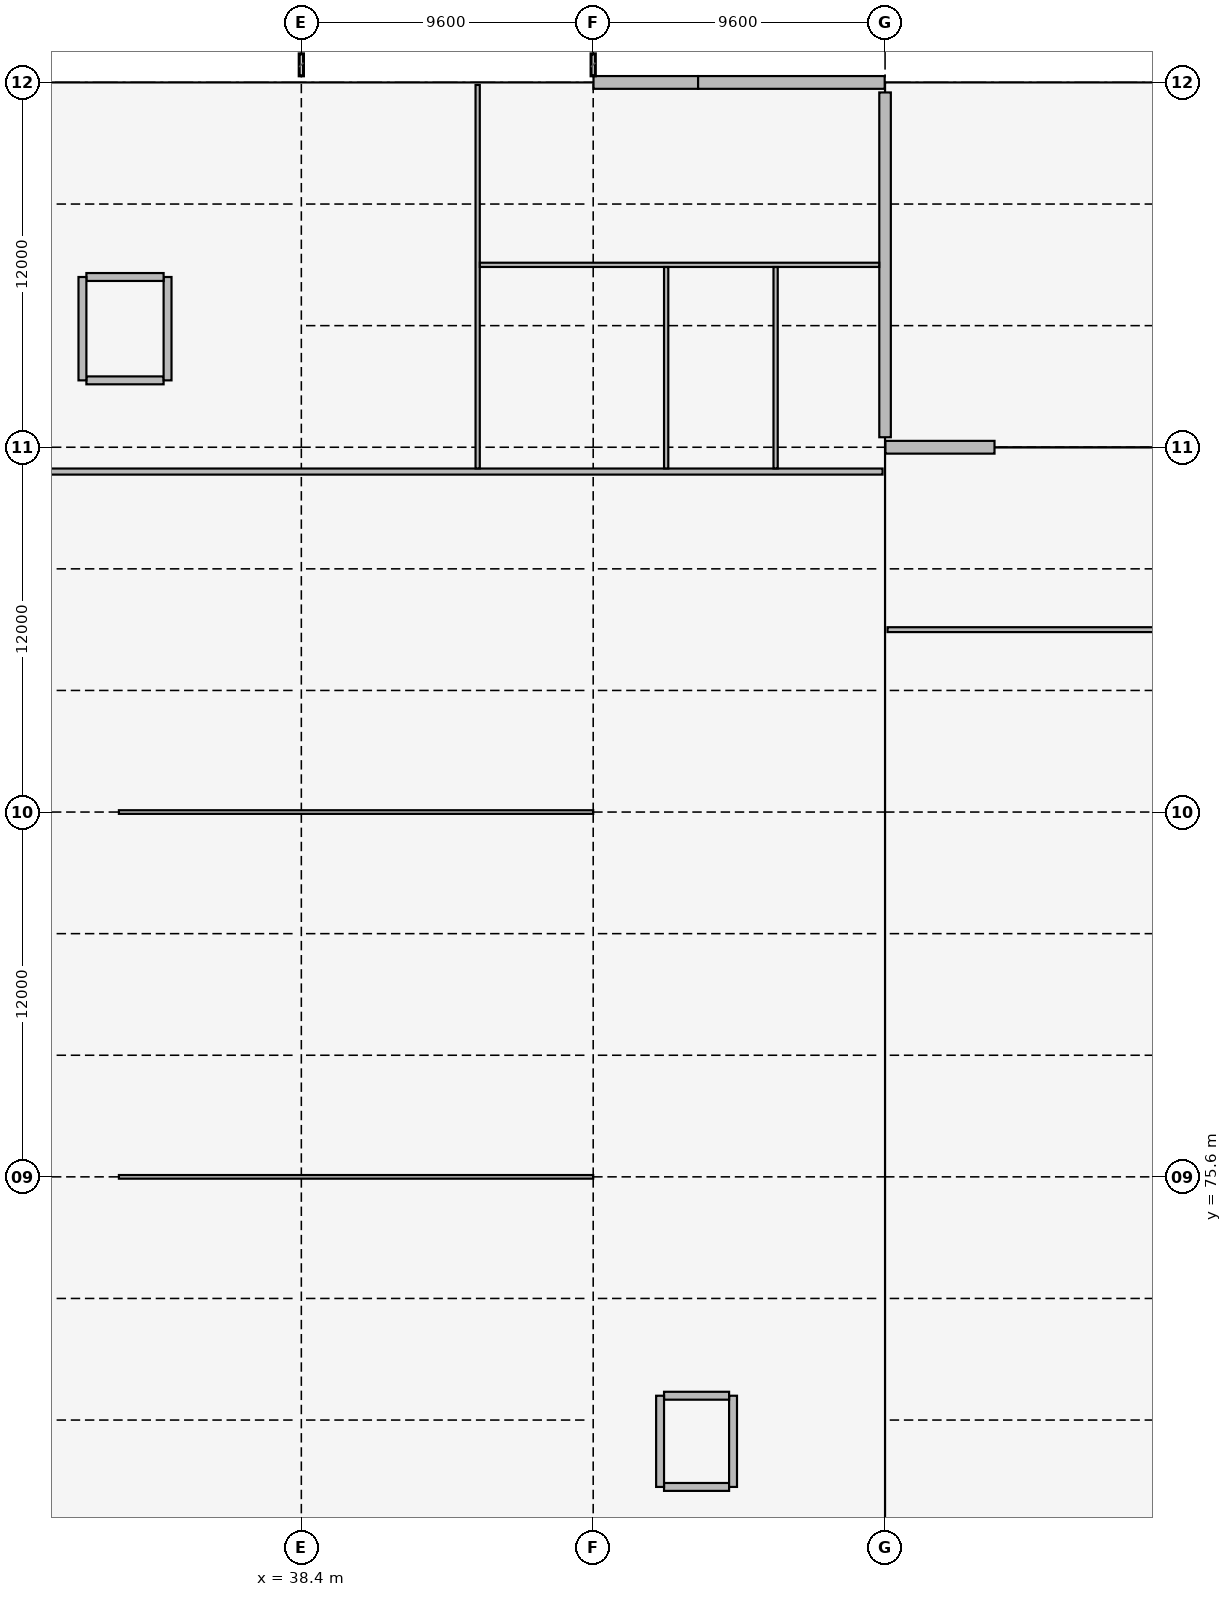
"""IFC4 building model, lengths in metres.
Left out: names, types, materials, properties, quantities, classifications, styles, units other than length and angle.
Written with IfcOpenShell. Run it as: python <this file> out.ifc"""

import sys

from ifc_helpers import new_model, si_unit, direction, frame, frame_2d, origin, origin_2d, place, context, subcontext, project, spatial, rectangle, i_section, extrude, element, fill, save


model = new_model("IFC4")
c1 = context("Model", 3, precision=1e-05, world=origin(), true_north=direction((0.0, 1.0)))
c2 = subcontext(c1, "Body", "Model", "MODEL_VIEW")
j1 = project(units=[si_unit("LENGTHUNIT", "METRE"), si_unit("PLANEANGLEUNIT", "RADIAN")], contexts=[c1])
p1 = place(None, origin())
s1 = spatial("IfcSite", under=j1, at=p1, CompositionType="ELEMENT")
p2 = place(p1, origin())
s2 = spatial("IfcBuilding", under=s1, at=p2, CompositionType="ELEMENT")
p3 = place(p2, origin())
s3 = spatial("IfcBuildingStorey", under=s2, at=p3, CompositionType="ELEMENT", Elevation=0.0)
for number, where, z_axis, x_axis in (
    (1, (38.4, 99.6, 0.0), (0.0, 0.0, 1.0), (1.0, 0.0, 0.0)),
    (2, (38.4, 111.6, 0.0), (0.0, 0.0, 1.0), (1.0, 0.0, 0.0)),
):
    element("IfcColumn", number, at=place(p3, frame(where, z_axis=z_axis, x_axis=x_axis)), inside=s3, PredefinedType="COLUMN", context=c2, shape_type="SweptSolid", body=[
        extrude(i_section(OverallWidth=0.3, OverallDepth=0.54, WebThickness=0.012, FlangeThickness=0.024, FilletRadius=0.027, at=origin_2d()), origin(), (0.0, 0.0, 1.0), 5.4),
    ])
p4 = place(p3, frame((48.0, 75.6, 0.0), z_axis=(0.0, 0.0, 1.0), x_axis=(1.0, 0.0, 0.0)))
e3 = element("IfcColumn", 3, at=p4, inside=s3, PredefinedType="COLUMN", context=c2, shape_type="SweptSolid", body=[
    extrude(i_section(OverallWidth=0.3, OverallDepth=0.44, WebThickness=0.011, FlangeThickness=0.021, FilletRadius=0.027, at=origin_2d()), origin(), (0.0, 0.0, 1.0), 5.4),
])
for number, where, z_axis, x_axis in (
    (4, (48.0, 87.6, 0.0), (0.0, 0.0, 1.0), (1.0, 0.0, 0.0)),
    (5, (48.0, 99.6, 0.0), (0.0, 0.0, 1.0), (1.0, 0.0, 0.0)),
    (6, (48.0, 111.6, 0.0), (0.0, 0.0, 1.0), (1.0, 0.0, 0.0)),
):
    element("IfcColumn", number, at=place(p3, frame(where, z_axis=z_axis, x_axis=x_axis)), inside=s3, PredefinedType="COLUMN", context=c2, shape_type="SweptSolid", body=[
        extrude(i_section(OverallWidth=0.3, OverallDepth=0.54, WebThickness=0.012, FlangeThickness=0.024, FilletRadius=0.027, at=origin_2d()), origin(), (0.0, 0.0, 1.0), 5.4),
    ])
for number, where, z_axis, x_axis in (
    (7, (57.6, 75.6, 0.0), (0.0, 0.0, 1.0), (1.0, 0.0, 0.0)),
    (8, (57.6, 87.6, 0.0), (0.0, 0.0, 1.0), (1.0, 0.0, 0.0)),
    (9, (57.6, 99.6, 0.0), (0.0, 0.0, 1.0), (1.0, 0.0, 0.0)),
    (10, (57.6, 111.6, 0.0), (0.0, 0.0, 1.0), (1.0, 0.0, 0.0)),
):
    element("IfcColumn", number, at=place(p3, frame(where, z_axis=z_axis, x_axis=x_axis)), inside=s3, PredefinedType="COLUMN", context=c2, shape_type="SweptSolid", body=[
        extrude(i_section(OverallWidth=0.3, OverallDepth=0.65, WebThickness=0.016, FlangeThickness=0.031, FilletRadius=0.027, at=origin_2d()), origin(), (0.0, 0.0, 1.0), 5.4),
    ])
p5 = place(p3, frame((50.33, 65.4, 0.0), z_axis=(0.0, 0.0, 1.0), x_axis=(1.0, 0.0, 0.0)))
e11 = element("IfcWall", 11, at=p5, inside=s3, PredefinedType="SHEAR", context=c2, shape_type="SweptSolid", body=[
    extrude(rectangle(XDim=2.14, YDim=0.26, at=frame_2d((1.07, 0.0))), origin(), (0.0, 0.0, 1.0), 5.12),
])
p6 = place(p3, frame((52.6, 65.4, 0.0), z_axis=(0.0, 0.0, 1.0), x_axis=(0.0, 1.0, 0.0)))
e12 = element("IfcWall", 12, at=p6, inside=s3, PredefinedType="SHEAR", context=c2, shape_type="SweptSolid", body=[
    extrude(rectangle(XDim=3.0, YDim=0.26, at=frame_2d((1.5, 0.0))), origin(), (0.0, 0.0, 1.0), 5.12),
])
p7 = place(p6, frame((0.95, 0.0, 0.0)))
e13 = element("IfcOpeningElement", 13, at=p7, cuts=e12, PredefinedType="OPENING", context=c2, shape_type="SweptSolid", body=[
    extrude(rectangle(XDim=1.1, YDim=2.1, at=frame_2d((0.55, 1.05))), frame((0.0, 0.14, 0.0), z_axis=(0.0, -1.0, 0.0), x_axis=(1.0, 0.0, 0.0)), (0.0, 0.0, 1.0), 0.28),
])
p8 = place(p3, frame((52.47, 68.4, 0.0), z_axis=(0.0, 0.0, 1.0), x_axis=(-1.0, 0.0, 0.0)))
e14 = element("IfcWall", 14, at=p8, inside=s3, PredefinedType="SHEAR", context=c2, shape_type="SweptSolid", body=[
    extrude(rectangle(XDim=2.14, YDim=0.26, at=frame_2d((1.07, 0.0))), origin(), (0.0, 0.0, 1.0), 5.12),
])
p9 = place(p3, frame((50.2, 68.4, 0.0), z_axis=(0.0, 0.0, 1.0), x_axis=(0.0, -1.0, 0.0)))
e15 = element("IfcWall", 15, at=p9, inside=s3, PredefinedType="SHEAR", context=c2, shape_type="SweptSolid", body=[
    extrude(rectangle(XDim=3.0, YDim=0.26, at=frame_2d((1.5, 0.0))), origin(), (0.0, 0.0, 1.0), 5.12),
])
p10 = place(p3, frame((31.33, 101.8, 0.0), z_axis=(0.0, 0.0, 1.0), x_axis=(1.0, 0.0, 0.0)))
e16 = element("IfcWall", 16, at=p10, inside=s3, PredefinedType="SHEAR", context=c2, shape_type="SweptSolid", body=[
    extrude(rectangle(XDim=2.54, YDim=0.26, at=frame_2d((1.27, 0.0))), origin(), (0.0, 0.0, 1.0), 5.12),
])
p11 = place(p3, frame((34.0, 101.8, 0.0), z_axis=(0.0, 0.0, 1.0), x_axis=(0.0, 1.0, 0.0)))
e17 = element("IfcWall", 17, at=p11, inside=s3, PredefinedType="SHEAR", context=c2, shape_type="SweptSolid", body=[
    extrude(rectangle(XDim=3.4, YDim=0.26, at=frame_2d((1.7, 0.0))), origin(), (0.0, 0.0, 1.0), 5.12),
])
p12 = place(p3, frame((33.87, 105.2, 0.0), z_axis=(0.0, 0.0, 1.0), x_axis=(-1.0, 0.0, 0.0)))
e18 = element("IfcWall", 18, at=p12, inside=s3, PredefinedType="SHEAR", context=c2, shape_type="SweptSolid", body=[
    extrude(rectangle(XDim=2.54, YDim=0.26, at=frame_2d((1.27, 0.0))), origin(), (0.0, 0.0, 1.0), 5.12),
])
p13 = place(p12, frame((0.57, 0.0, 0.0)))
e19 = element("IfcOpeningElement", 19, at=p13, cuts=e18, PredefinedType="OPENING", context=c2, shape_type="SweptSolid", body=[
    extrude(rectangle(XDim=1.4, YDim=2.25, at=frame_2d((0.7, 1.125))), frame((0.0, 0.14, 0.0), z_axis=(0.0, -1.0, 0.0), x_axis=(1.0, 0.0, 0.0)), (0.0, 0.0, 1.0), 0.28),
])
p14 = place(p3, frame((31.2, 105.2, 0.0), z_axis=(0.0, 0.0, 1.0), x_axis=(0.0, -1.0, 0.0)))
e20 = element("IfcWall", 20, at=p14, inside=s3, PredefinedType="SHEAR", context=c2, shape_type="SweptSolid", body=[
    extrude(rectangle(XDim=3.4, YDim=0.26, at=frame_2d((1.7, 0.0))), origin(), (0.0, 0.0, 1.0), 5.12),
])
p15 = place(p3, frame((48.01, 111.6, 0.0), z_axis=(0.0, 0.0, 1.0), x_axis=(1.0, 0.0, 0.0)))
e21 = element("IfcWall", 21, at=p15, inside=s3, PredefinedType="STANDARD", context=c2, shape_type="SweptSolid", body=[
    extrude(rectangle(XDim=3.44, YDim=0.42, at=frame_2d((1.72, 0.0))), origin(), (0.0, 0.0, 1.0), 4.665),
])
p16 = place(p15, frame((0.45, 0.0, 0.0)))
e22 = element("IfcOpeningElement", 22, at=p16, cuts=e21, PredefinedType="OPENING", context=c2, shape_type="SweptSolid", body=[
    extrude(rectangle(XDim=2.2, YDim=2.4, at=frame_2d((1.1, 1.2))), frame((0.0, 0.22, 0.0), z_axis=(0.0, -1.0, 0.0), x_axis=(1.0, 0.0, 0.0)), (0.0, 0.0, 1.0), 0.44),
])
p17 = place(p3, frame((51.45, 111.6, 0.0), z_axis=(0.0, 0.0, 1.0), x_axis=(1.0, 0.0, 0.0)))
e23 = element("IfcWall", 23, at=p17, inside=s3, PredefinedType="STANDARD", context=c2, shape_type="SweptSolid", body=[
    extrude(rectangle(XDim=6.138, YDim=0.42, at=frame_2d((3.069, 0.0))), origin(), (0.0, 0.0, 1.0), 4.665),
])
p18 = place(p17, frame((0.6, 0.0, 1.5)))
e24 = element("IfcOpeningElement", 24, at=p18, cuts=e23, PredefinedType="OPENING", context=c2, shape_type="SweptSolid", body=[
    extrude(rectangle(XDim=3.2, YDim=1.2, at=frame_2d((1.6, 0.6))), frame((0.0, 0.22, 0.0), z_axis=(0.0, -1.0, 0.0), x_axis=(1.0, 0.0, 0.0)), (0.0, 0.0, 1.0), 0.44),
])
p19 = place(p3, frame((57.6, 111.271, 0.0), z_axis=(0.0, 0.0, 1.0), x_axis=(0.0, -1.0, 0.0)))
e25 = element("IfcWall", 25, at=p19, inside=s3, PredefinedType="STANDARD", context=c2, shape_type="SweptSolid", body=[
    extrude(rectangle(XDim=11.342, YDim=0.38, at=frame_2d((5.671, 0.0))), origin(), (0.0, 0.0, 1.0), 4.7),
])
p20 = place(p19, frame((0.45, 0.0, 1.2)))
e26 = element("IfcOpeningElement", 26, at=p20, cuts=e25, PredefinedType="OPENING", context=c2, shape_type="SweptSolid", body=[
    extrude(rectangle(XDim=1.65, YDim=1.75, at=frame_2d((0.825, 0.875))), frame((0.0, 0.2, 0.0), z_axis=(0.0, -1.0, 0.0), x_axis=(1.0, 0.0, 0.0)), (0.0, 0.0, 1.0), 0.4),
])
p21 = place(p19, frame((3.05, 0.0, 1.2)))
e27 = element("IfcOpeningElement", 27, at=p21, cuts=e25, PredefinedType="OPENING", context=c2, shape_type="SweptSolid", body=[
    extrude(rectangle(XDim=2.7, YDim=1.8, at=frame_2d((1.35, 0.9))), frame((0.0, 0.2, 0.0), z_axis=(0.0, -1.0, 0.0), x_axis=(1.0, 0.0, 0.0)), (0.0, 0.0, 1.0), 0.4),
])
p22 = place(p19, frame((6.6, 0.0, 1.2)))
e28 = element("IfcOpeningElement", 28, at=p22, cuts=e25, PredefinedType="OPENING", context=c2, shape_type="SweptSolid", body=[
    extrude(rectangle(XDim=1.35, YDim=1.75, at=frame_2d((0.675, 0.875))), frame((0.0, 0.2, 0.0), z_axis=(0.0, -1.0, 0.0), x_axis=(1.0, 0.0, 0.0)), (0.0, 0.0, 1.0), 0.4),
])
p23 = place(p3, frame((57.612, 99.6, 0.0), z_axis=(0.0, 0.0, 1.0), x_axis=(1.0, 0.0, 0.0)))
e29 = element("IfcWall", 29, at=p23, inside=s3, PredefinedType="STANDARD", context=c2, shape_type="SweptSolid", body=[
    extrude(rectangle(XDim=3.588, YDim=0.42, at=frame_2d((1.794, 0.0))), origin(), (0.0, 0.0, 1.0), 4.665),
])
p24 = place(p23, frame((0.45, 0.0, 0.0)))
e30 = element("IfcOpeningElement", 30, at=p24, cuts=e29, PredefinedType="OPENING", context=c2, shape_type="SweptSolid", body=[
    extrude(rectangle(XDim=2.2, YDim=2.4, at=frame_2d((1.1, 1.2))), frame((0.0, 0.22, 0.0), z_axis=(0.0, -1.0, 0.0), x_axis=(1.0, 0.0, 0.0)), (0.0, 0.0, 1.0), 0.44),
])
for number, where, z_axis, x_axis in (
    (31, (32.4, 75.6, 0.0), (0.0, 0.0, 1.0), (1.0, 0.0, 0.0)),
    (32, (32.4, 87.6, 0.0), (0.0, 0.0, 1.0), (1.0, 0.0, 0.0)),
):
    element("IfcWall", number, at=place(p3, frame(where, z_axis=z_axis, x_axis=x_axis)), inside=s3, PredefinedType="PARTITIONING", context=c2, shape_type="SweptSolid", body=[
        extrude(rectangle(XDim=15.6, YDim=0.12, at=frame_2d((7.8, 0.0))), origin(), (0.0, 0.0, 1.0), 2.4),
    ])
p25 = place(p3, frame((0.212, 98.8, 0.0), z_axis=(0.0, 0.0, 1.0), x_axis=(1.0, 0.0, 0.0)))
e33 = element("IfcWall", 33, at=p25, inside=s3, PredefinedType="PARTITIONING", context=c2, shape_type="SweptSolid", body=[
    extrude(rectangle(XDim=57.306, YDim=0.2, at=frame_2d((28.653, 0.0))), origin(), (0.0, 0.0, 1.0), 5.04),
])
p26 = place(p25, frame((13.5, 0.0, 0.0)))
e34 = element("IfcOpeningElement", 34, at=p26, cuts=e33, PredefinedType="OPENING", context=c2, shape_type="SweptSolid", body=[
    extrude(rectangle(XDim=1.6, YDim=2.2, at=frame_2d((0.8, 1.1))), frame((0.0, 0.11, 0.0), z_axis=(0.0, -1.0, 0.0), x_axis=(1.0, 0.0, 0.0)), (0.0, 0.0, 1.0), 0.22),
])
p27 = place(p25, frame((33.333, 0.0, 0.0)))
e35 = element("IfcOpeningElement", 35, at=p27, cuts=e33, PredefinedType="OPENING", context=c2, shape_type="SweptSolid", body=[
    extrude(rectangle(XDim=1.6, YDim=2.2, at=frame_2d((0.8, 1.1))), frame((0.0, 0.11, 0.0), z_axis=(0.0, -1.0, 0.0), x_axis=(1.0, 0.0, 0.0)), (0.0, 0.0, 1.0), 0.22),
])
p28 = place(p25, frame((44.267, 0.0, 0.0)))
e36 = element("IfcOpeningElement", 36, at=p28, cuts=e33, PredefinedType="OPENING", context=c2, shape_type="SweptSolid", body=[
    extrude(rectangle(XDim=1.02, YDim=2.12, at=frame_2d((0.51, 1.06))), frame((0.0, 0.11, 0.0), z_axis=(0.0, -1.0, 0.0), x_axis=(1.0, 0.0, 0.0)), (0.0, 0.0, 1.0), 0.22),
])
p29 = place(p25, frame((51.067, 0.0, 0.0)))
e37 = element("IfcOpeningElement", 37, at=p29, cuts=e33, PredefinedType="OPENING", context=c2, shape_type="SweptSolid", body=[
    extrude(rectangle(XDim=0.95, YDim=2.1, at=frame_2d((0.475, 1.05))), frame((0.0, 0.11, 0.0), z_axis=(0.0, -1.0, 0.0), x_axis=(1.0, 0.0, 0.0)), (0.0, 0.0, 1.0), 0.22),
])
p30 = place(p25, frame((54.0, 0.0, 0.0)))
e38 = element("IfcOpeningElement", 38, at=p30, cuts=e33, PredefinedType="OPENING", context=c2, shape_type="SweptSolid", body=[
    extrude(rectangle(XDim=1.0, YDim=2.1, at=frame_2d((0.5, 1.05))), frame((0.0, 0.11, 0.0), z_axis=(0.0, -1.0, 0.0), x_axis=(1.0, 0.0, 0.0)), (0.0, 0.0, 1.0), 0.22),
])
p31 = place(p3, frame((44.2, 98.902, 0.0), z_axis=(0.0, 0.0, 1.0), x_axis=(0.0, 1.0, 0.0)))
e39 = element("IfcWall", 39, at=p31, inside=s3, PredefinedType="PARTITIONING", context=c2, shape_type="SweptSolid", body=[
    extrude(rectangle(XDim=12.616, YDim=0.14, at=frame_2d((6.308, 0.0))), origin(), (0.0, 0.0, 1.0), 5.04),
])
p32 = place(p31, frame((8.0, 0.0, 0.0)))
e40 = element("IfcOpeningElement", 40, at=p32, cuts=e39, PredefinedType="OPENING", context=c2, shape_type="SweptSolid", body=[
    extrude(rectangle(XDim=1.05, YDim=2.15, at=frame_2d((0.525, 1.075))), frame((0.0, 0.08, 0.0), z_axis=(0.0, -1.0, 0.0), x_axis=(1.0, 0.0, 0.0)), (0.0, 0.0, 1.0), 0.16),
])
p33 = place(p3, frame((44.272, 105.6, 0.0), z_axis=(0.0, 0.0, 1.0), x_axis=(1.0, 0.0, 0.0)))
e41 = element("IfcWall", 41, at=p33, inside=s3, PredefinedType="PARTITIONING", context=c2, shape_type="SweptSolid", body=[
    extrude(rectangle(XDim=13.136, YDim=0.14, at=frame_2d((6.568, 0.0))), origin(), (0.0, 0.0, 1.0), 5.04),
])
for number, where, z_axis, x_axis in (
    (42, (50.4, 98.902, 0.0), (0.0, 0.0, 1.0), (0.0, 1.0, 0.0)),
    (43, (54.0, 98.902, 0.0), (0.0, 0.0, 1.0), (0.0, 1.0, 0.0)),
):
    element("IfcWall", number, at=place(p3, frame(where, z_axis=z_axis, x_axis=x_axis)), inside=s3, PredefinedType="PARTITIONING", context=c2, shape_type="SweptSolid", body=[
        extrude(rectangle(XDim=6.626, YDim=0.14, at=frame_2d((3.313, 0.0))), origin(), (0.0, 0.0, 1.0), 5.04),
    ])
p34 = place(p3, frame((57.682, 93.6, 0.0), z_axis=(0.0, 0.0, 1.0), x_axis=(1.0, 0.0, 0.0)))
e44 = element("IfcWall", 44, at=p34, inside=s3, PredefinedType="PARTITIONING", context=c2, shape_type="SweptSolid", body=[
    extrude(rectangle(XDim=10.936, YDim=0.16, at=frame_2d((5.468, 0.0))), origin(), (0.0, 0.0, 1.0), 5.04),
])
p35 = place(p34, frame((3.5, 0.0, 0.0)))
e45 = element("IfcOpeningElement", 45, at=p35, cuts=e44, PredefinedType="OPENING", context=c2, shape_type="SweptSolid", body=[
    extrude(rectangle(XDim=1.7, YDim=2.2, at=frame_2d((0.85, 1.1))), frame((0.0, 0.09, 0.0), z_axis=(0.0, -1.0, 0.0), x_axis=(1.0, 0.0, 0.0)), (0.0, 0.0, 1.0), 0.18),
])
p36 = place(p16, origin())
e46 = element("IfcDoor", 46, at=p36, inside=s3, OperationType="DOUBLE_DOOR_SINGLE_SWING", PredefinedType="DOOR", context=c2, shape_type="SweptSolid", body=[
    extrude(rectangle(XDim=2.2, YDim=2.4, at=frame_2d((1.1, 1.2))), frame((0.0, 0.025, 0.0), z_axis=(0.0, -1.0, 0.0), x_axis=(1.0, 0.0, 0.0)), (0.0, 0.0, 1.0), 0.05),
])
fill(e22, e46)
p37 = place(p18, origin())
e47 = element("IfcWindow", 47, at=p37, inside=s3, PartitioningType="SINGLE_PANEL", PredefinedType="WINDOW", context=c2, shape_type="SweptSolid", body=[
    extrude(rectangle(XDim=3.2, YDim=1.2, at=frame_2d((1.6, 0.6))), frame((0.0, 0.03, 0.0), z_axis=(0.0, -1.0, 0.0), x_axis=(1.0, 0.0, 0.0)), (0.0, 0.0, 1.0), 0.06),
])
fill(e24, e47)
p38 = place(p20, origin())
e48 = element("IfcWindow", 48, at=p38, inside=s3, PartitioningType="SINGLE_PANEL", PredefinedType="WINDOW", context=c2, shape_type="SweptSolid", body=[
    extrude(rectangle(XDim=1.65, YDim=1.75, at=frame_2d((0.825, 0.875))), frame((0.0, 0.03, 0.0), z_axis=(0.0, -1.0, 0.0), x_axis=(1.0, 0.0, 0.0)), (0.0, 0.0, 1.0), 0.06),
])
fill(e26, e48)
p39 = place(p21, origin())
e49 = element("IfcWindow", 49, at=p39, inside=s3, PartitioningType="SINGLE_PANEL", PredefinedType="WINDOW", context=c2, shape_type="SweptSolid", body=[
    extrude(rectangle(XDim=2.7, YDim=1.8, at=frame_2d((1.35, 0.9))), frame((0.0, 0.03, 0.0), z_axis=(0.0, -1.0, 0.0), x_axis=(1.0, 0.0, 0.0)), (0.0, 0.0, 1.0), 0.06),
])
fill(e27, e49)
p40 = place(p22, origin())
e50 = element("IfcWindow", 50, at=p40, inside=s3, PartitioningType="SINGLE_PANEL", PredefinedType="WINDOW", context=c2, shape_type="SweptSolid", body=[
    extrude(rectangle(XDim=1.35, YDim=1.75, at=frame_2d((0.675, 0.875))), frame((0.0, 0.03, 0.0), z_axis=(0.0, -1.0, 0.0), x_axis=(1.0, 0.0, 0.0)), (0.0, 0.0, 1.0), 0.06),
])
fill(e28, e50)
p41 = place(p24, origin())
e51 = element("IfcDoor", 51, at=p41, inside=s3, OperationType="DOUBLE_DOOR_SINGLE_SWING", PredefinedType="DOOR", context=c2, shape_type="SweptSolid", body=[
    extrude(rectangle(XDim=2.2, YDim=2.4, at=frame_2d((1.1, 1.2))), frame((0.0, 0.025, 0.0), z_axis=(0.0, -1.0, 0.0), x_axis=(1.0, 0.0, 0.0)), (0.0, 0.0, 1.0), 0.05),
])
fill(e30, e51)
p42 = place(p27, origin())
e52 = element("IfcDoor", 52, at=p42, inside=s3, OperationType="SINGLE_SWING_LEFT", PredefinedType="DOOR", context=c2, shape_type="SweptSolid", body=[
    extrude(rectangle(XDim=1.6, YDim=2.2, at=frame_2d((0.8, 1.1))), frame((0.0, 0.025, 0.0), z_axis=(0.0, -1.0, 0.0), x_axis=(1.0, 0.0, 0.0)), (0.0, 0.0, 1.0), 0.05),
])
fill(e35, e52)
p43 = place(p28, origin())
e53 = element("IfcDoor", 53, at=p43, inside=s3, OperationType="SINGLE_SWING_RIGHT", PredefinedType="DOOR", context=c2, shape_type="SweptSolid", body=[
    extrude(rectangle(XDim=1.02, YDim=2.12, at=frame_2d((0.51, 1.06))), frame((0.0, 0.025, 0.0), z_axis=(0.0, -1.0, 0.0), x_axis=(1.0, 0.0, 0.0)), (0.0, 0.0, 1.0), 0.05),
])
fill(e36, e53)
p44 = place(p29, origin())
e54 = element("IfcDoor", 54, at=p44, inside=s3, OperationType="SINGLE_SWING_LEFT", PredefinedType="DOOR", context=c2, shape_type="SweptSolid", body=[
    extrude(rectangle(XDim=0.95, YDim=2.1, at=frame_2d((0.475, 1.05))), frame((0.0, 0.025, 0.0), z_axis=(0.0, -1.0, 0.0), x_axis=(1.0, 0.0, 0.0)), (0.0, 0.0, 1.0), 0.05),
])
fill(e37, e54)
p45 = place(p30, origin())
e55 = element("IfcDoor", 55, at=p45, inside=s3, OperationType="SINGLE_SWING_RIGHT", PredefinedType="DOOR", context=c2, shape_type="SweptSolid", body=[
    extrude(rectangle(XDim=1.0, YDim=2.1, at=frame_2d((0.5, 1.05))), frame((0.0, 0.025, 0.0), z_axis=(0.0, -1.0, 0.0), x_axis=(1.0, 0.0, 0.0)), (0.0, 0.0, 1.0), 0.05),
])
fill(e38, e55)
p46 = place(p32, origin())
e56 = element("IfcDoor", 56, at=p46, inside=s3, OperationType="SINGLE_SWING_LEFT", PredefinedType="DOOR", context=c2, shape_type="SweptSolid", body=[
    extrude(rectangle(XDim=1.05, YDim=2.15, at=frame_2d((0.525, 1.075))), frame((0.0, 0.025, 0.0), z_axis=(0.0, -1.0, 0.0), x_axis=(1.0, 0.0, 0.0)), (0.0, 0.0, 1.0), 0.05),
])
fill(e40, e56)
p47 = place(p35, origin())
e57 = element("IfcDoor", 57, at=p47, inside=s3, OperationType="DOUBLE_DOOR_SINGLE_SWING", PredefinedType="DOOR", context=c2, shape_type="SweptSolid", body=[
    extrude(rectangle(XDim=1.7, YDim=2.2, at=frame_2d((0.85, 1.1))), frame((0.0, 0.025, 0.0), z_axis=(0.0, -1.0, 0.0), x_axis=(1.0, 0.0, 0.0)), (0.0, 0.0, 1.0), 0.05),
])
fill(e45, e57)
p48 = place(p7, origin())
e58 = element("IfcDoor", 58, at=p48, inside=s3, OperationType="SLIDING_TO_LEFT", PredefinedType="DOOR", context=c2, shape_type="SweptSolid", body=[
    extrude(rectangle(XDim=1.1, YDim=2.1, at=frame_2d((0.55, 1.05))), frame((0.0, 0.025, 0.0), z_axis=(0.0, -1.0, 0.0), x_axis=(1.0, 0.0, 0.0)), (0.0, 0.0, 1.0), 0.05),
])
fill(e13, e58)
p49 = place(p13, origin())
e59 = element("IfcDoor", 59, at=p49, inside=s3, OperationType="DOUBLE_DOOR_SLIDING", PredefinedType="DOOR", context=c2, shape_type="SweptSolid", body=[
    extrude(rectangle(XDim=1.4, YDim=2.25, at=frame_2d((0.7, 1.125))), frame((0.0, 0.025, 0.0), z_axis=(0.0, -1.0, 0.0), x_axis=(1.0, 0.0, 0.0)), (0.0, 0.0, 1.0), 0.05),
])
fill(e19, e59)
save(model, sys.argv[1])
